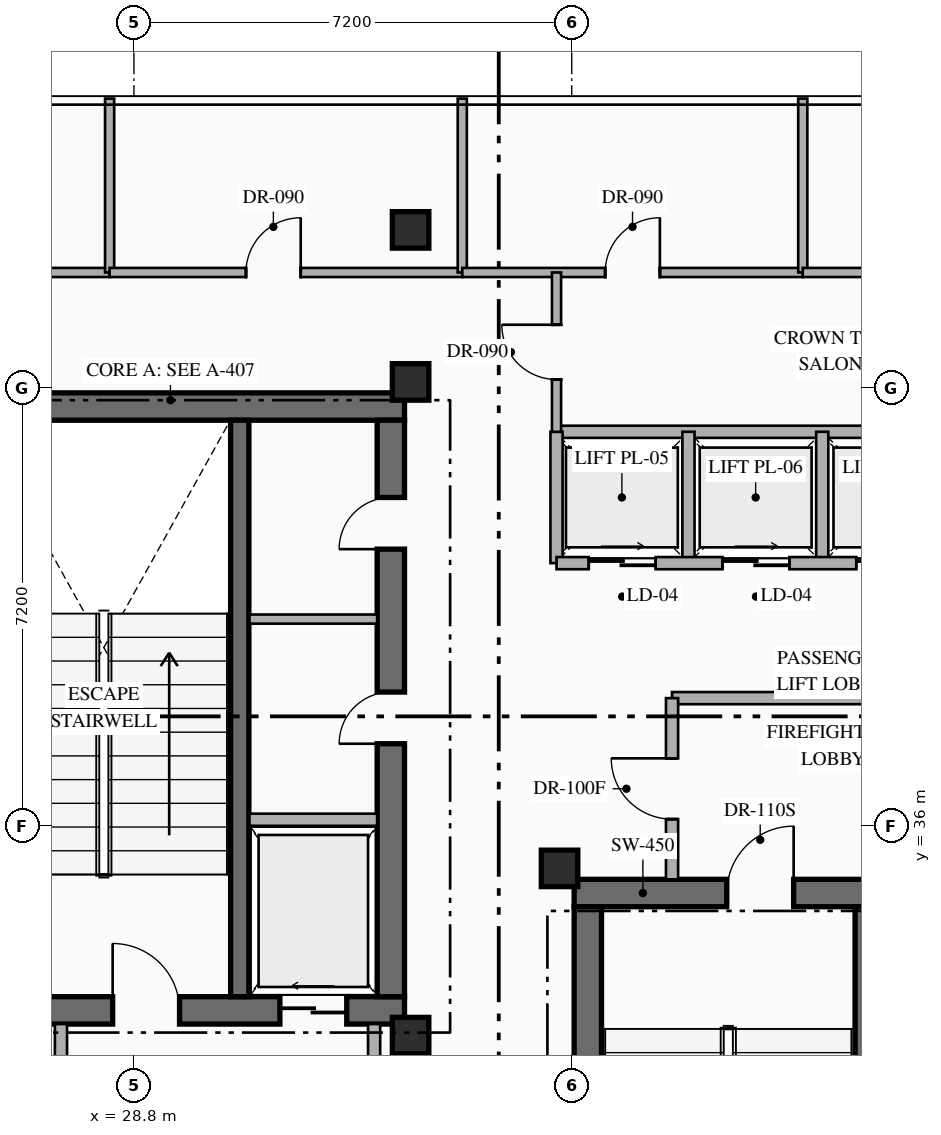
"""IFC4 building model, lengths in metres.
Left out: names, types, materials, properties, quantities, classifications, styles, units other than length and angle.
Written with IfcOpenShell. Run it as: python <this file> out.ifc"""

import sys

from ifc_helpers import new_model, si_unit, direction, frame, frame_2d, origin, origin_2d, place, context, subcontext, project, spatial, rectangle, hollow_rectangle, extrude, element, fill, save


model = new_model("IFC4")
c1 = context("Model", 3, precision=1e-05, world=origin(), true_north=direction((0.0, 1.0)))
c2 = subcontext(c1, "Body", "Model", "MODEL_VIEW")
j1 = project(units=[si_unit("LENGTHUNIT", "METRE"), si_unit("PLANEANGLEUNIT", "RADIAN")], contexts=[c1])
p1 = place(None, origin())
s1 = spatial("IfcSite", under=j1, at=p1, CompositionType="ELEMENT")
p2 = place(p1, origin())
s2 = spatial("IfcBuilding", under=s1, at=p2, CompositionType="ELEMENT")
p3 = place(p2, frame((0.0, 0.0, 269.95)))
s3 = spatial("IfcBuildingStorey", under=s2, at=p3, CompositionType="ELEMENT", Elevation=269.95)
p4 = place(p3, frame((25.77, 32.965, 0.0), z_axis=(0.0, 0.0, 1.0), x_axis=(1.0, 0.0, 0.0)))
e1 = element("IfcWall", 1, at=p4, inside=s3, PredefinedType="SHEAR", context=c2, shape_type="SweptSolid", body=[
    extrude(rectangle(XDim=7.48, YDim=0.45, at=frame_2d((3.74, 0.0))), origin(), (0.0, 0.0, 1.0), 4.0),
])
p5 = place(p4, frame((2.68, 0.0, 0.0)))
e2 = element("IfcOpeningElement", 2, at=p5, cuts=e1, PredefinedType="OPENING", context=c2, shape_type="SweptSolid", body=[
    extrude(rectangle(XDim=1.1, YDim=2.2, at=frame_2d((0.55, 1.1))), frame((0.0, 0.235, 0.0), z_axis=(0.0, -1.0, 0.0), x_axis=(1.0, 0.0, 0.0)), (0.0, 0.0, 1.0), 0.47),
])
p6 = place(p4, frame((5.43, 0.0, 0.0)))
e3 = element("IfcOpeningElement", 3, at=p6, cuts=e1, PredefinedType="OPENING", context=c2, shape_type="SweptSolid", body=[
    extrude(rectangle(XDim=1.1, YDim=2.15, at=frame_2d((0.55, 1.075))), frame((0.0, 0.235, 0.0), z_axis=(0.0, -1.0, 0.0), x_axis=(1.0, 0.0, 0.0)), (0.0, 0.0, 1.0), 0.47),
])
p7 = place(p3, frame((25.77, 42.895, 0.0), z_axis=(0.0, 0.0, 1.0), x_axis=(1.0, 0.0, 0.0)))
e4 = element("IfcWall", 4, at=p7, inside=s3, PredefinedType="SHEAR", context=c2, shape_type="SweptSolid", body=[
    extrude(rectangle(XDim=7.48, YDim=0.45, at=frame_2d((3.74, 0.0))), origin(), (0.0, 0.0, 1.0), 4.0),
])
p8 = place(p3, frame((33.025, 33.19, 0.0), z_axis=(0.0, 0.0, 1.0), x_axis=(0.0, 1.0, 0.0)))
e5 = element("IfcWall", 5, at=p8, inside=s3, PredefinedType="SHEAR", context=c2, shape_type="SweptSolid", body=[
    extrude(rectangle(XDim=9.48, YDim=0.45, at=frame_2d((4.74, 0.0))), origin(), (0.0, 0.0, 1.0), 4.0),
])
p9 = place(p8, frame((4.16, 0.0, 0.0)))
e6 = element("IfcOpeningElement", 6, at=p9, cuts=e5, PredefinedType="OPENING", context=c2, shape_type="SweptSolid", body=[
    extrude(rectangle(XDim=0.85, YDim=2.08, at=frame_2d((0.425, 1.04))), frame((0.0, 0.235, 0.0), z_axis=(0.0, -1.0, 0.0), x_axis=(1.0, 0.0, 0.0)), (0.0, 0.0, 1.0), 0.47),
])
p10 = place(p8, frame((7.36, 0.0, 0.0)))
e7 = element("IfcOpeningElement", 7, at=p10, cuts=e5, PredefinedType="OPENING", context=c2, shape_type="SweptSolid", body=[
    extrude(rectangle(XDim=0.85, YDim=2.08, at=frame_2d((0.425, 1.04))), frame((0.0, 0.235, 0.0), z_axis=(0.0, -1.0, 0.0), x_axis=(1.0, 0.0, 0.0)), (0.0, 0.0, 1.0), 0.47),
])
p11 = place(p3, frame((30.54, 33.19, 0.0), z_axis=(0.0, 0.0, 1.0), x_axis=(0.0, 1.0, 0.0)))
e8 = element("IfcWall", 8, at=p11, inside=s3, PredefinedType="SHEAR", context=c2, shape_type="SweptSolid", body=[
    extrude(rectangle(XDim=9.48, YDim=0.3, at=frame_2d((4.74, 0.0))), origin(), (0.0, 0.0, 1.0), 4.0),
])
p12 = place(p3, frame((36.04, 34.895, 0.0), z_axis=(0.0, 0.0, 1.0), x_axis=(1.0, 0.0, 0.0)))
e9 = element("IfcWall", 9, at=p12, inside=s3, PredefinedType="SHEAR", context=c2, shape_type="SweptSolid", body=[
    extrude(rectangle(XDim=7.46, YDim=0.45, at=frame_2d((3.73, 0.0))), origin(), (0.0, 0.0, 1.0), 4.0),
])
p13 = place(p12, frame((2.51, 0.0, 0.0)))
e10 = element("IfcOpeningElement", 10, at=p13, cuts=e9, PredefinedType="OPENING", context=c2, shape_type="SweptSolid", body=[
    extrude(rectangle(XDim=1.1, YDim=2.2, at=frame_2d((0.55, 1.1))), frame((0.0, 0.235, 0.0), z_axis=(0.0, -1.0, 0.0), x_axis=(1.0, 0.0, 0.0)), (0.0, 0.0, 1.0), 0.47),
])
p14 = place(p12, frame((5.41, 0.0, 0.0)))
e11 = element("IfcOpeningElement", 11, at=p14, cuts=e9, PredefinedType="OPENING", context=c2, shape_type="SweptSolid", body=[
    extrude(rectangle(XDim=1.12, YDim=2.15, at=frame_2d((0.56, 1.075))), frame((0.0, 0.235, 0.0), z_axis=(0.0, -1.0, 0.0), x_axis=(1.0, 0.0, 0.0)), (0.0, 0.0, 1.0), 0.47),
])
p15 = place(p3, frame((36.265, 25.19, 0.0), z_axis=(0.0, 0.0, 1.0), x_axis=(0.0, 1.0, 0.0)))
e12 = element("IfcWall", 12, at=p15, inside=s3, PredefinedType="SHEAR", context=c2, shape_type="SweptSolid", body=[
    extrude(rectangle(XDim=9.48, YDim=0.45, at=frame_2d((4.74, 0.0))), origin(), (0.0, 0.0, 1.0), 4.0),
])
p16 = place(p3, frame((40.81, 25.19, 0.0), z_axis=(0.0, 0.0, 1.0), x_axis=(0.0, 1.0, 0.0)))
e13 = element("IfcWall", 13, at=p16, inside=s3, PredefinedType="SHEAR", context=c2, shape_type="SweptSolid", body=[
    extrude(rectangle(XDim=9.48, YDim=0.3, at=frame_2d((4.74, 0.0))), origin(), (0.0, 0.0, 1.0), 4.0),
])
for number, where, z_axis, x_axis in (
    (14, (33.35, 32.55, 0.0), (0.0, 0.0, 1.0), (1.0, 0.0, 0.0)),
    (15, (33.35, 43.3, 0.0), (0.0, 0.0, 1.0), (1.0, 0.0, 0.0)),
    (16, (35.8, 35.3, 0.0), (0.0, 0.0, 1.0), (1.0, 0.0, 0.0)),
    (17, (33.35, 45.8, 0.0), (0.0, 0.0, 1.0), (1.0, 0.0, 0.0)),
):
    element("IfcColumn", number, at=place(p3, frame(where, z_axis=z_axis, x_axis=x_axis)), inside=s3, PredefinedType="COLUMN", context=c2, shape_type="SweptSolid", body=[
        extrude(hollow_rectangle(XDim=0.6, YDim=0.6, WallThickness=0.025, at=origin_2d()), origin(), (0.0, 0.0, 1.0), 4.0),
    ])
p17 = place(p3, frame((30.7, 36.1, 0.0), z_axis=(0.0, 0.0, 1.0), x_axis=(1.0, 0.0, 0.0)))
e18 = element("IfcWall", 18, at=p17, inside=s3, PredefinedType="STANDARD", context=c2, shape_type="SweptSolid", body=[
    extrude(rectangle(XDim=2.1, YDim=0.2, at=frame_2d((1.05, 0.0))), origin(), (0.0, 0.0, 1.0), 3.74),
])
p18 = place(p3, frame((30.7, 39.4, 0.0), z_axis=(0.0, 0.0, 1.0), x_axis=(1.0, 0.0, 0.0)))
e19 = element("IfcWall", 19, at=p18, inside=s3, PredefinedType="PARTITIONING", context=c2, shape_type="SweptSolid", body=[
    extrude(rectangle(XDim=2.1, YDim=0.15, at=frame_2d((1.05, 0.0))), origin(), (0.0, 0.0, 1.0), 3.74),
])
p19 = place(p3, frame((27.6, 29.2, 0.0), z_axis=(0.0, 0.0, 1.0), x_axis=(0.0, 1.0, 0.0)))
e20 = element("IfcWall", 20, at=p19, inside=s3, PredefinedType="STANDARD", context=c2, shape_type="SweptSolid", body=[
    extrude(rectangle(XDim=3.54, YDim=0.2, at=frame_2d((1.77, 0.0))), origin(), (0.0, 0.0, 1.0), 3.74),
])
p20 = place(p3, frame((32.75, 29.2, 0.0), z_axis=(0.0, 0.0, 1.0), x_axis=(0.0, 1.0, 0.0)))
e21 = element("IfcWall", 21, at=p20, inside=s3, PredefinedType="STANDARD", context=c2, shape_type="SweptSolid", body=[
    extrude(rectangle(XDim=3.54, YDim=0.2, at=frame_2d((1.77, 0.0))), origin(), (0.0, 0.0, 1.0), 3.74),
])
p21 = place(p20, frame((1.45, 0.0, 0.0)))
e22 = element("IfcOpeningElement", 22, at=p21, cuts=e21, PredefinedType="OPENING", context=c2, shape_type="SweptSolid", body=[
    extrude(rectangle(XDim=1.0, YDim=2.2, at=frame_2d((0.5, 1.1))), frame((0.0, 0.11, 0.0), z_axis=(0.0, -1.0, 0.0), x_axis=(1.0, 0.0, 0.0)), (0.0, 0.0, 1.0), 0.22),
])
p22 = place(p3, frame((37.65, 38.1, 0.0), z_axis=(0.0, 0.0, 1.0), x_axis=(1.0, 0.0, 0.0)))
e23 = element("IfcWall", 23, at=p22, inside=s3, PredefinedType="STANDARD", context=c2, shape_type="SweptSolid", body=[
    extrude(rectangle(XDim=5.3, YDim=0.2, at=frame_2d((2.65, 0.0))), origin(), (0.0, 0.0, 1.0), 3.74),
])
p23 = place(p3, frame((37.65, 35.12, 0.0), z_axis=(0.0, 0.0, 1.0), x_axis=(0.0, 1.0, 0.0)))
e24 = element("IfcWall", 24, at=p23, inside=s3, PredefinedType="STANDARD", context=c2, shape_type="SweptSolid", body=[
    extrude(rectangle(XDim=2.98, YDim=0.2, at=frame_2d((1.49, 0.0))), origin(), (0.0, 0.0, 1.0), 3.74),
])
p24 = place(p23, frame((0.99, 0.0, 0.0)))
e25 = element("IfcOpeningElement", 25, at=p24, cuts=e24, PredefinedType="OPENING", context=c2, shape_type="SweptSolid", body=[
    extrude(rectangle(XDim=1.0, YDim=2.2, at=frame_2d((0.5, 1.1))), frame((0.0, 0.11, 0.0), z_axis=(0.0, -1.0, 0.0), x_axis=(1.0, 0.0, 0.0)), (0.0, 0.0, 1.0), 0.22),
])
p25 = place(p3, frame((35.75, 42.48, 0.0), z_axis=(0.0, 0.0, 1.0), x_axis=(1.0, 0.0, 0.0)))
e26 = element("IfcWall", 26, at=p25, inside=s3, PredefinedType="STANDARD", context=c2, shape_type="SweptSolid", body=[
    extrude(rectangle(XDim=9.11, YDim=0.2, at=frame_2d((4.555, 0.0))), origin(), (0.0, 0.0, 1.0), 3.74),
])
for number, where, z_axis, x_axis in (
    (27, (35.75, 40.32, 0.0), (0.0, 0.0, 1.0), (0.0, 1.0, 0.0)),
    (28, (37.92, 40.32, 0.0), (0.0, 0.0, 1.0), (0.0, 1.0, 0.0)),
    (29, (40.12, 40.32, 0.0), (0.0, 0.0, 1.0), (0.0, 1.0, 0.0)),
):
    element("IfcWall", number, at=place(p3, frame(where, z_axis=z_axis, x_axis=x_axis)), inside=s3, PredefinedType="STANDARD", context=c2, shape_type="SweptSolid", body=[
        extrude(rectangle(XDim=2.16, YDim=0.2, at=frame_2d((1.08, 0.0))), origin(), (0.0, 0.0, 1.0), 3.74),
    ])
p26 = place(p3, frame((35.75, 40.32, 0.0), z_axis=(0.0, 0.0, 1.0), x_axis=(1.0, 0.0, 0.0)))
e30 = element("IfcWall", 30, at=p26, inside=s3, PredefinedType="STANDARD", context=c2, shape_type="SweptSolid", body=[
    extrude(rectangle(XDim=9.11, YDim=0.2, at=frame_2d((4.555, 0.0))), origin(), (0.0, 0.0, 1.0), 3.74),
])
p27 = place(p26, frame((0.53, 0.0, 0.0)))
e31 = element("IfcOpeningElement", 31, at=p27, cuts=e30, PredefinedType="OPENING", context=c2, shape_type="SweptSolid", body=[
    extrude(rectangle(XDim=1.1, YDim=2.18, at=frame_2d((0.55, 1.09))), frame((0.0, 0.11, 0.0), z_axis=(0.0, -1.0, 0.0), x_axis=(1.0, 0.0, 0.0)), (0.0, 0.0, 1.0), 0.22),
])
p28 = place(p26, frame((2.73, 0.0, 0.0)))
e32 = element("IfcOpeningElement", 32, at=p28, cuts=e30, PredefinedType="OPENING", context=c2, shape_type="SweptSolid", body=[
    extrude(rectangle(XDim=1.1, YDim=2.18, at=frame_2d((0.55, 1.09))), frame((0.0, 0.11, 0.0), z_axis=(0.0, -1.0, 0.0), x_axis=(1.0, 0.0, 0.0)), (0.0, 0.0, 1.0), 0.22),
])
p29 = place(p26, frame((4.93, 0.0, 0.0)))
e33 = element("IfcOpeningElement", 33, at=p29, cuts=e30, PredefinedType="OPENING", context=c2, shape_type="SweptSolid", body=[
    extrude(rectangle(XDim=1.1, YDim=2.18, at=frame_2d((0.55, 1.09))), frame((0.0, 0.11, 0.0), z_axis=(0.0, -1.0, 0.0), x_axis=(1.0, 0.0, 0.0)), (0.0, 0.0, 1.0), 0.22),
])
p30 = place(p26, frame((7.13, 0.0, 0.0)))
e34 = element("IfcOpeningElement", 34, at=p30, cuts=e30, PredefinedType="OPENING", context=c2, shape_type="SweptSolid", body=[
    extrude(rectangle(XDim=1.1, YDim=2.18, at=frame_2d((0.55, 1.09))), frame((0.0, 0.11, 0.0), z_axis=(0.0, -1.0, 0.0), x_axis=(1.0, 0.0, 0.0)), (0.0, 0.0, 1.0), 0.22),
])
p31 = place(p3, frame((22.15, 45.1, 0.0), z_axis=(0.0, 0.0, 1.0), x_axis=(1.0, 0.0, 0.0)))
e35 = element("IfcWall", 35, at=p31, inside=s3, PredefinedType="PARTITIONING", context=c2, shape_type="SweptSolid", body=[
    extrude(rectangle(XDim=6.25, YDim=0.15, at=frame_2d((3.125, 0.0))), origin(), (0.0, 0.0, 1.0), 3.74),
])
p32 = place(p31, frame((0.839, 0.0, 0.0)))
e36 = element("IfcOpeningElement", 36, at=p32, cuts=e35, PredefinedType="OPENING", context=c2, shape_type="SweptSolid", body=[
    extrude(rectangle(XDim=0.9, YDim=2.15, at=frame_2d((0.45, 1.075))), frame((0.0, 0.085, 0.0), z_axis=(0.0, -1.0, 0.0), x_axis=(1.0, 0.0, 0.0)), (0.0, 0.0, 1.0), 0.17),
])
p33 = place(p3, frame((28.4, 45.1, 0.0), z_axis=(0.0, 0.0, 1.0), x_axis=(0.0, 1.0, 0.0)))
e37 = element("IfcWall", 37, at=p33, inside=s3, PredefinedType="PARTITIONING", context=c2, shape_type="SweptSolid", body=[
    extrude(rectangle(XDim=2.86, YDim=0.15, at=frame_2d((1.43, 0.0))), origin(), (0.0, 0.0, 1.0), 3.74),
])
p34 = place(p3, frame((28.4, 45.1, 0.0), z_axis=(0.0, 0.0, 1.0), x_axis=(1.0, 0.0, 0.0)))
e38 = element("IfcWall", 38, at=p34, inside=s3, PredefinedType="PARTITIONING", context=c2, shape_type="SweptSolid", body=[
    extrude(rectangle(XDim=5.8, YDim=0.15, at=frame_2d((2.9, 0.0))), origin(), (0.0, 0.0, 1.0), 3.74),
])
p35 = place(p34, frame((2.243, 0.0, 0.0)))
e39 = element("IfcOpeningElement", 39, at=p35, cuts=e38, PredefinedType="OPENING", context=c2, shape_type="SweptSolid", body=[
    extrude(rectangle(XDim=0.9, YDim=2.15, at=frame_2d((0.45, 1.075))), frame((0.0, 0.085, 0.0), z_axis=(0.0, -1.0, 0.0), x_axis=(1.0, 0.0, 0.0)), (0.0, 0.0, 1.0), 0.17),
])
p36 = place(p3, frame((34.2, 45.1, 0.0), z_axis=(0.0, 0.0, 1.0), x_axis=(0.0, 1.0, 0.0)))
e40 = element("IfcWall", 40, at=p36, inside=s3, PredefinedType="PARTITIONING", context=c2, shape_type="SweptSolid", body=[
    extrude(rectangle(XDim=2.86, YDim=0.15, at=frame_2d((1.43, 0.0))), origin(), (0.0, 0.0, 1.0), 3.74),
])
p37 = place(p3, frame((34.2, 45.1, 0.0), z_axis=(0.0, 0.0, 1.0), x_axis=(1.0, 0.0, 0.0)))
e41 = element("IfcWall", 41, at=p37, inside=s3, PredefinedType="PARTITIONING", context=c2, shape_type="SweptSolid", body=[
    extrude(rectangle(XDim=5.6, YDim=0.15, at=frame_2d((2.8, 0.0))), origin(), (0.0, 0.0, 1.0), 3.74),
])
p38 = place(p37, frame((2.35, 0.0, 0.0)))
e42 = element("IfcOpeningElement", 42, at=p38, cuts=e41, PredefinedType="OPENING", context=c2, shape_type="SweptSolid", body=[
    extrude(rectangle(XDim=0.9, YDim=2.15, at=frame_2d((0.45, 1.075))), frame((0.0, 0.085, 0.0), z_axis=(0.0, -1.0, 0.0), x_axis=(1.0, 0.0, 0.0)), (0.0, 0.0, 1.0), 0.17),
])
p39 = place(p3, frame((39.8, 45.1, 0.0), z_axis=(0.0, 0.0, 1.0), x_axis=(0.0, 1.0, 0.0)))
e43 = element("IfcWall", 43, at=p39, inside=s3, PredefinedType="PARTITIONING", context=c2, shape_type="SweptSolid", body=[
    extrude(rectangle(XDim=2.86, YDim=0.15, at=frame_2d((1.43, 0.0))), origin(), (0.0, 0.0, 1.0), 3.74),
])
p40 = place(p3, frame((39.8, 45.1, 0.0), z_axis=(0.0, 0.0, 1.0), x_axis=(1.0, 0.0, 0.0)))
e44 = element("IfcWall", 44, at=p40, inside=s3, PredefinedType="PARTITIONING", context=c2, shape_type="SweptSolid", body=[
    extrude(rectangle(XDim=5.16, YDim=0.15, at=frame_2d((2.58, 0.0))), origin(), (0.0, 0.0, 1.0), 3.74),
])
p41 = place(p40, frame((1.255, 0.0, 0.0)))
e45 = element("IfcOpeningElement", 45, at=p41, cuts=e44, PredefinedType="OPENING", context=c2, shape_type="SweptSolid", body=[
    extrude(rectangle(XDim=0.9, YDim=2.15, at=frame_2d((0.45, 1.075))), frame((0.0, 0.085, 0.0), z_axis=(0.0, -1.0, 0.0), x_axis=(1.0, 0.0, 0.0)), (0.0, 0.0, 1.0), 0.17),
])
p42 = place(p3, frame((35.75, 42.48, 0.0), z_axis=(0.0, 0.0, 1.0), x_axis=(0.0, 1.0, 0.0)))
e46 = element("IfcWall", 46, at=p42, inside=s3, PredefinedType="PARTITIONING", context=c2, shape_type="SweptSolid", body=[
    extrude(rectangle(XDim=2.62, YDim=0.15, at=frame_2d((1.31, 0.0))), origin(), (0.0, 0.0, 1.0), 3.74),
])
p43 = place(p42, frame((0.86, 0.0, 0.0)))
e47 = element("IfcOpeningElement", 47, at=p43, cuts=e46, PredefinedType="OPENING", context=c2, shape_type="SweptSolid", body=[
    extrude(rectangle(XDim=0.9, YDim=2.15, at=frame_2d((0.45, 1.075))), frame((0.0, 0.085, 0.0), z_axis=(0.0, -1.0, 0.0), x_axis=(1.0, 0.0, 0.0)), (0.0, 0.0, 1.0), 0.17),
])
p44 = place(p5, origin())
e48 = element("IfcDoor", 48, at=p44, inside=s3, OperationType="SINGLE_SWING_LEFT", PredefinedType="DOOR", context=c2, shape_type="SweptSolid", body=[
    extrude(rectangle(XDim=1.1, YDim=2.2, at=frame_2d((0.55, 1.1))), frame((0.0, 0.025, 0.0), z_axis=(0.0, -1.0, 0.0), x_axis=(1.0, 0.0, 0.0)), (0.0, 0.0, 1.0), 0.05),
])
fill(e2, e48)
p45 = place(p6, origin())
e49 = element("IfcDoor", 49, at=p45, inside=s3, OperationType="SLIDING_TO_LEFT", PredefinedType="USERDEFINED", context=c2, shape_type="SweptSolid", body=[
    extrude(rectangle(XDim=1.1, YDim=2.15, at=frame_2d((0.55, 1.075))), frame((0.0, 0.025, 0.0), z_axis=(0.0, -1.0, 0.0), x_axis=(1.0, 0.0, 0.0)), (0.0, 0.0, 1.0), 0.05),
])
fill(e3, e49)
p46 = place(p13, origin())
e50 = element("IfcDoor", 50, at=p46, inside=s3, OperationType="SINGLE_SWING_RIGHT", PredefinedType="DOOR", context=c2, shape_type="SweptSolid", body=[
    extrude(rectangle(XDim=1.1, YDim=2.2, at=frame_2d((0.55, 1.1))), frame((0.0, 0.025, 0.0), z_axis=(0.0, -1.0, 0.0), x_axis=(1.0, 0.0, 0.0)), (0.0, 0.0, 1.0), 0.05),
])
fill(e10, e50)
p47 = place(p9, origin())
e51 = element("IfcDoor", 51, at=p47, inside=s3, OperationType="SINGLE_SWING_LEFT", PredefinedType="DOOR", context=c2, shape_type="SweptSolid", body=[
    extrude(rectangle(XDim=0.85, YDim=2.08, at=frame_2d((0.425, 1.04))), frame((0.0, 0.025, 0.0), z_axis=(0.0, -1.0, 0.0), x_axis=(1.0, 0.0, 0.0)), (0.0, 0.0, 1.0), 0.05),
])
fill(e6, e51)
p48 = place(p10, origin())
e52 = element("IfcDoor", 52, at=p48, inside=s3, OperationType="SINGLE_SWING_LEFT", PredefinedType="DOOR", context=c2, shape_type="SweptSolid", body=[
    extrude(rectangle(XDim=0.85, YDim=2.08, at=frame_2d((0.425, 1.04))), frame((0.0, 0.025, 0.0), z_axis=(0.0, -1.0, 0.0), x_axis=(1.0, 0.0, 0.0)), (0.0, 0.0, 1.0), 0.05),
])
fill(e7, e52)
p49 = place(p24, origin())
e53 = element("IfcDoor", 53, at=p49, inside=s3, OperationType="SINGLE_SWING_RIGHT", PredefinedType="DOOR", context=c2, shape_type="SweptSolid", body=[
    extrude(rectangle(XDim=1.0, YDim=2.2, at=frame_2d((0.5, 1.1))), frame((0.0, 0.025, 0.0), z_axis=(0.0, -1.0, 0.0), x_axis=(1.0, 0.0, 0.0)), (0.0, 0.0, 1.0), 0.05),
])
fill(e25, e53)
p50 = place(p27, origin())
e54 = element("IfcDoor", 54, at=p50, inside=s3, OperationType="SLIDING_TO_RIGHT", PredefinedType="USERDEFINED", context=c2, shape_type="SweptSolid", body=[
    extrude(rectangle(XDim=1.1, YDim=2.18, at=frame_2d((0.55, 1.09))), frame((0.0, 0.025, 0.0), z_axis=(0.0, -1.0, 0.0), x_axis=(1.0, 0.0, 0.0)), (0.0, 0.0, 1.0), 0.05),
])
fill(e31, e54)
p51 = place(p28, origin())
e55 = element("IfcDoor", 55, at=p51, inside=s3, OperationType="SLIDING_TO_RIGHT", PredefinedType="USERDEFINED", context=c2, shape_type="SweptSolid", body=[
    extrude(rectangle(XDim=1.1, YDim=2.18, at=frame_2d((0.55, 1.09))), frame((0.0, 0.025, 0.0), z_axis=(0.0, -1.0, 0.0), x_axis=(1.0, 0.0, 0.0)), (0.0, 0.0, 1.0), 0.05),
])
fill(e32, e55)
p52 = place(p29, origin())
e56 = element("IfcDoor", 56, at=p52, inside=s3, OperationType="SLIDING_TO_RIGHT", PredefinedType="USERDEFINED", context=c2, shape_type="SweptSolid", body=[
    extrude(rectangle(XDim=1.1, YDim=2.18, at=frame_2d((0.55, 1.09))), frame((0.0, 0.025, 0.0), z_axis=(0.0, -1.0, 0.0), x_axis=(1.0, 0.0, 0.0)), (0.0, 0.0, 1.0), 0.05),
])
fill(e33, e56)
p53 = place(p35, origin())
e57 = element("IfcDoor", 57, at=p53, inside=s3, OperationType="SINGLE_SWING_RIGHT", PredefinedType="DOOR", context=c2, shape_type="SweptSolid", body=[
    extrude(rectangle(XDim=0.9, YDim=2.15, at=frame_2d((0.45, 1.075))), frame((0.0, 0.025, 0.0), z_axis=(0.0, -1.0, 0.0), x_axis=(1.0, 0.0, 0.0)), (0.0, 0.0, 1.0), 0.05),
])
fill(e39, e57)
p54 = place(p38, origin())
e58 = element("IfcDoor", 58, at=p54, inside=s3, OperationType="SINGLE_SWING_RIGHT", PredefinedType="DOOR", context=c2, shape_type="SweptSolid", body=[
    extrude(rectangle(XDim=0.9, YDim=2.15, at=frame_2d((0.45, 1.075))), frame((0.0, 0.025, 0.0), z_axis=(0.0, -1.0, 0.0), x_axis=(1.0, 0.0, 0.0)), (0.0, 0.0, 1.0), 0.05),
])
fill(e42, e58)
p55 = place(p43, origin())
e59 = element("IfcDoor", 59, at=p55, inside=s3, OperationType="SINGLE_SWING_RIGHT", PredefinedType="DOOR", context=c2, shape_type="SweptSolid", body=[
    extrude(rectangle(XDim=0.9, YDim=2.15, at=frame_2d((0.45, 1.075))), frame((0.0, 0.025, 0.0), z_axis=(0.0, -1.0, 0.0), x_axis=(1.0, 0.0, 0.0)), (0.0, 0.0, 1.0), 0.05),
])
fill(e47, e59)
save(model, sys.argv[1])
